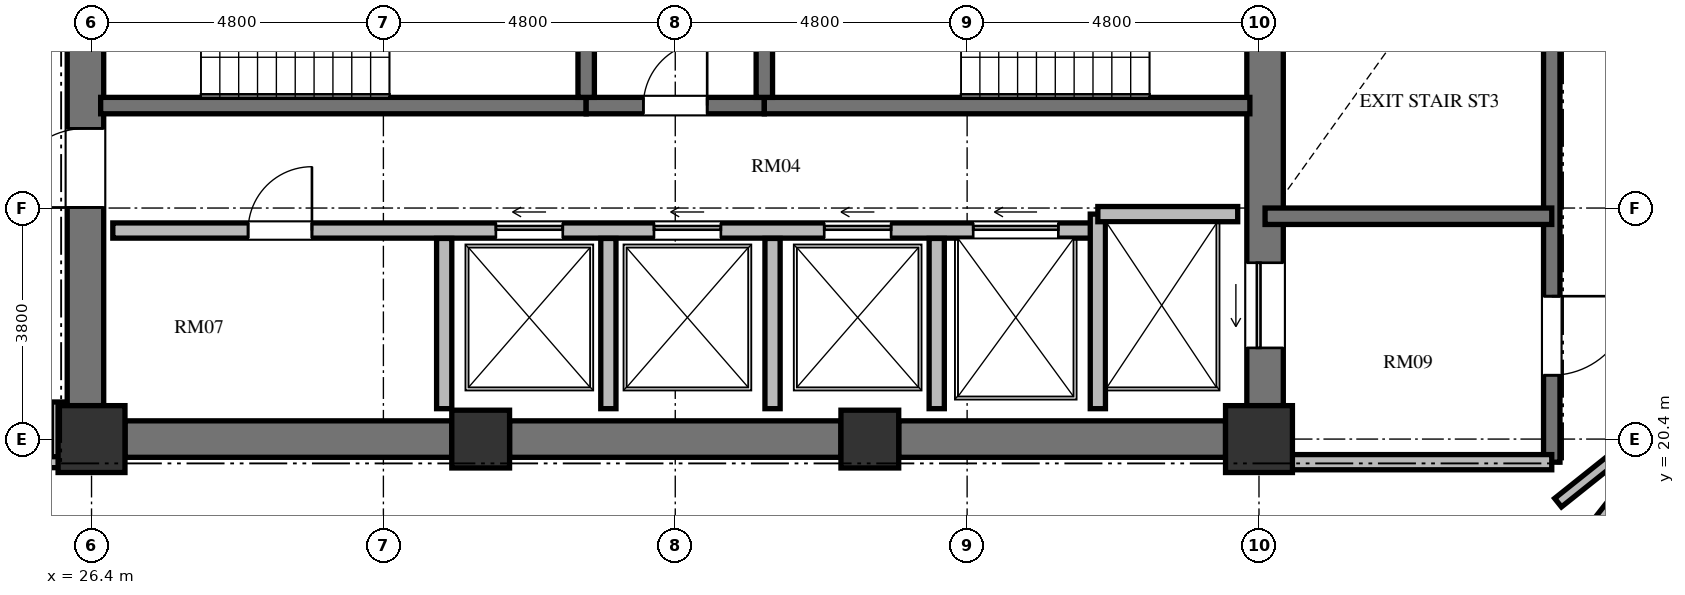
"""IFC4 building model, lengths in metres.
Left out: names, types, materials, properties, quantities, classifications, styles, units other than length and angle.
Written with IfcOpenShell. Run it as: python <this file> out.ifc"""

import sys

from ifc_helpers import new_model, si_unit, direction, frame, frame_2d, origin, origin_2d, place, context, subcontext, project, spatial, rectangle, extrude, element, fill, save


model = new_model("IFC4")
c1 = context("Model", 3, precision=1e-05, world=origin(), true_north=direction((0.0, 1.0)))
c2 = subcontext(c1, "Body", "Model", "MODEL_VIEW")
j1 = project(units=[si_unit("LENGTHUNIT", "METRE"), si_unit("PLANEANGLEUNIT", "RADIAN")], contexts=[c1])
p1 = place(None, origin())
s1 = spatial("IfcSite", under=j1, at=p1, CompositionType="ELEMENT")
p2 = place(p1, origin())
s2 = spatial("IfcBuilding", under=s1, at=p2, CompositionType="ELEMENT")
p3 = place(p2, frame((0.0, 0.0, 178.416)))
s3 = spatial("IfcBuildingStorey", under=s2, at=p3, CompositionType="ELEMENT", Elevation=178.416)
p4 = place(p3, frame((26.4, 20.4, 0.0), z_axis=(0.0, 0.0, 1.0), x_axis=(1.0, 0.0, 0.0)))
e1 = element("IfcColumn", 1, at=p4, inside=s3, PredefinedType="COLUMN", context=c2, shape_type="SweptSolid", body=[
    extrude(rectangle(XDim=1.1, YDim=1.1, at=origin_2d()), origin(), (0.0, 0.0, 1.0), 3.648),
])
for number, where, z_axis, x_axis in (
    (2, (32.8, 20.4, 0.0), (0.0, 0.0, 1.0), (1.0, 0.0, 0.0)),
    (3, (39.2, 20.4, 0.0), (0.0, 0.0, 1.0), (1.0, 0.0, 0.0)),
):
    element("IfcColumn", number, at=place(p3, frame(where, z_axis=z_axis, x_axis=x_axis)), inside=s3, PredefinedType="COLUMN", context=c2, shape_type="SweptSolid", body=[
        extrude(rectangle(XDim=0.95, YDim=0.95, at=origin_2d()), origin(), (0.0, 0.0, 1.0), 3.648),
    ])
p5 = place(p3, frame((45.6, 20.4, 0.0), z_axis=(0.0, 0.0, 1.0), x_axis=(1.0, 0.0, 0.0)))
e4 = element("IfcColumn", 4, at=p5, inside=s3, PredefinedType="COLUMN", context=c2, shape_type="SweptSolid", body=[
    extrude(rectangle(XDim=1.1, YDim=1.1, at=origin_2d()), origin(), (0.0, 0.0, 1.0), 3.648),
])
p6 = place(p3, frame((26.3, 20.95, 0.0), z_axis=(0.0, 0.0, 1.0), x_axis=(0.0, 1.0, 0.0)))
e5 = element("IfcWall", 5, at=p6, inside=s3, PredefinedType="SHEAR", context=c2, shape_type="SweptSolid", body=[
    extrude(rectangle(XDim=14.1, YDim=0.6, at=frame_2d((7.05, 0.0))), origin(), (0.0, 0.0, 1.0), 3.648),
])
p7 = place(p6, frame((6.5, 0.0, 0.0)))
e6 = element("IfcOpeningElement", 6, at=p7, cuts=e5, PredefinedType="OPENING", context=c2, shape_type="SweptSolid", body=[
    extrude(rectangle(XDim=1.2, YDim=2.15, at=frame_2d((0.6, 1.075))), frame((0.0, 0.31, 0.0), z_axis=(0.0, -1.0, 0.0), x_axis=(1.0, 0.0, 0.0)), (0.0, 0.0, 1.0), 0.62),
])
p8 = place(p6, frame((9.6, 0.0, 0.0)))
e7 = element("IfcOpeningElement", 7, at=p8, cuts=e5, PredefinedType="OPENING", context=c2, shape_type="SweptSolid", body=[
    extrude(rectangle(XDim=1.3, YDim=2.2, at=frame_2d((0.65, 1.1))), frame((0.0, 0.31, 0.0), z_axis=(0.0, -1.0, 0.0), x_axis=(1.0, 0.0, 0.0)), (0.0, 0.0, 1.0), 0.62),
])
p9 = place(p6, frame((3.26, 0.0, 0.0)))
e8 = element("IfcOpeningElement", 8, at=p9, cuts=e5, PredefinedType="OPENING", context=c2, shape_type="SweptSolid", body=[
    extrude(rectangle(XDim=1.3, YDim=2.2, at=frame_2d((0.65, 1.1))), frame((0.0, 0.31, 0.0), z_axis=(0.0, -1.0, 0.0), x_axis=(1.0, 0.0, 0.0)), (0.0, 0.0, 1.0), 0.62),
])
p10 = place(p3, frame((45.7, 20.95, 0.0), z_axis=(0.0, 0.0, 1.0), x_axis=(0.0, 1.0, 0.0)))
e9 = element("IfcWall", 9, at=p10, inside=s3, PredefinedType="SHEAR", context=c2, shape_type="SweptSolid", body=[
    extrude(rectangle(XDim=14.1, YDim=0.6, at=frame_2d((7.05, 0.0))), origin(), (0.0, 0.0, 1.0), 3.648),
])
p11 = place(p10, frame((11.75, 0.0, 0.0)))
e10 = element("IfcOpeningElement", 10, at=p11, cuts=e9, PredefinedType="OPENING", context=c2, shape_type="SweptSolid", body=[
    extrude(rectangle(XDim=1.4, YDim=2.3, at=frame_2d((0.7, 1.15))), frame((0.0, 0.31, 0.0), z_axis=(0.0, -1.0, 0.0), x_axis=(1.0, 0.0, 0.0)), (0.0, 0.0, 1.0), 0.62),
])
p12 = place(p10, frame((0.95, 0.0, 0.0)))
e11 = element("IfcOpeningElement", 11, at=p12, cuts=e9, PredefinedType="OPENING", context=c2, shape_type="SweptSolid", body=[
    extrude(rectangle(XDim=1.4, YDim=2.3, at=frame_2d((0.7, 1.15))), frame((0.0, 0.31, 0.0), z_axis=(0.0, -1.0, 0.0), x_axis=(1.0, 0.0, 0.0)), (0.0, 0.0, 1.0), 0.62),
])
p13 = place(p3, frame((26.95, 20.4, 0.0), z_axis=(0.0, 0.0, 1.0), x_axis=(1.0, 0.0, 0.0)))
e12 = element("IfcWall", 12, at=p13, inside=s3, PredefinedType="SHEAR", context=c2, shape_type="SweptSolid", body=[
    extrude(rectangle(XDim=5.375, YDim=0.6, at=frame_2d((2.688, 0.0))), origin(), (0.0, 0.0, 1.0), 3.648),
])
p14 = place(p3, frame((33.275, 20.4, 0.0), z_axis=(0.0, 0.0, 1.0), x_axis=(1.0, 0.0, 0.0)))
e13 = element("IfcWall", 13, at=p14, inside=s3, PredefinedType="SHEAR", context=c2, shape_type="SweptSolid", body=[
    extrude(rectangle(XDim=5.45, YDim=0.6, at=frame_2d((2.725, 0.0))), origin(), (0.0, 0.0, 1.0), 3.648),
])
p15 = place(p3, frame((39.675, 20.4, 0.0), z_axis=(0.0, 0.0, 1.0), x_axis=(1.0, 0.0, 0.0)))
e14 = element("IfcWall", 14, at=p15, inside=s3, PredefinedType="SHEAR", context=c2, shape_type="SweptSolid", body=[
    extrude(rectangle(XDim=5.375, YDim=0.6, at=frame_2d((2.688, 0.0))), origin(), (0.0, 0.0, 1.0), 3.648),
])
p16 = place(p3, frame((26.55, 25.885, 0.0), z_axis=(0.0, 0.0, 1.0), x_axis=(1.0, 0.0, 0.0)))
e15 = element("IfcWall", 15, at=p16, inside=s3, PredefinedType="SHEAR", context=c2, shape_type="SweptSolid", body=[
    extrude(rectangle(XDim=7.985, YDim=0.27, at=frame_2d((3.992, 0.0))), origin(), (0.0, 0.0, 1.0), 3.648),
])
p17 = place(p3, frame((34.535, 25.885, 0.0), z_axis=(0.0, 0.0, 1.0), x_axis=(1.0, 0.0, 0.0)))
e16 = element("IfcWall", 16, at=p17, inside=s3, PredefinedType="SHEAR", context=c2, shape_type="SweptSolid", body=[
    extrude(rectangle(XDim=2.93, YDim=0.27, at=frame_2d((1.465, 0.0))), origin(), (0.0, 0.0, 1.0), 3.648),
])
p18 = place(p17, frame((0.94, 0.0, 0.0)))
e17 = element("IfcOpeningElement", 17, at=p18, cuts=e16, PredefinedType="OPENING", context=c2, shape_type="SweptSolid", body=[
    extrude(rectangle(XDim=1.05, YDim=2.15, at=frame_2d((0.525, 1.075))), frame((0.0, 0.145, 0.0), z_axis=(0.0, -1.0, 0.0), x_axis=(1.0, 0.0, 0.0)), (0.0, 0.0, 1.0), 0.29),
])
p19 = place(p3, frame((37.465, 25.885, 0.0), z_axis=(0.0, 0.0, 1.0), x_axis=(1.0, 0.0, 0.0)))
e18 = element("IfcWall", 18, at=p19, inside=s3, PredefinedType="SHEAR", context=c2, shape_type="SweptSolid", body=[
    extrude(rectangle(XDim=7.985, YDim=0.27, at=frame_2d((3.992, 0.0))), origin(), (0.0, 0.0, 1.0), 3.648),
])
for number, where, z_axis, x_axis in (
    (19, (34.535, 26.02, 0.0), (0.0, 0.0, 1.0), (0.0, 1.0, 0.0)),
    (20, (37.465, 26.02, 0.0), (0.0, 0.0, 1.0), (0.0, 1.0, 0.0)),
):
    element("IfcWall", number, at=place(p3, frame(where, z_axis=z_axis, x_axis=x_axis)), inside=s3, PredefinedType="SHEAR", context=c2, shape_type="SweptSolid", body=[
        extrude(rectangle(XDim=4.08, YDim=0.27, at=frame_2d((2.04, 0.0))), origin(), (0.0, 0.0, 1.0), 3.648),
    ])
p20 = place(p3, frame((26.75, 23.83, 0.0), z_axis=(0.0, 0.0, 1.0), x_axis=(1.0, 0.0, 0.0)))
e21 = element("IfcWall", 21, at=p20, inside=s3, PredefinedType="SOLIDWALL", context=c2, shape_type="SweptSolid", body=[
    extrude(rectangle(XDim=16.2, YDim=0.25, at=frame_2d((8.1, 0.0))), origin(), (0.0, 0.0, 1.0), 3.428),
])
p21 = place(p20, frame((2.225, 0.0, 0.0)))
e22 = element("IfcOpeningElement", 22, at=p21, cuts=e21, PredefinedType="OPENING", context=c2, shape_type="SweptSolid", body=[
    extrude(rectangle(XDim=1.05, YDim=2.15, at=frame_2d((0.525, 1.075))), frame((0.0, 0.135, 0.0), z_axis=(0.0, -1.0, 0.0), x_axis=(1.0, 0.0, 0.0)), (0.0, 0.0, 1.0), 0.27),
])
p22 = place(p20, frame((6.3, 0.0, 0.0)))
e23 = element("IfcOpeningElement", 23, at=p22, cuts=e21, PredefinedType="OPENING", context=c2, shape_type="SweptSolid", body=[
    extrude(rectangle(XDim=1.1, YDim=2.2, at=frame_2d((0.55, 1.1))), frame((0.0, 0.135, 0.0), z_axis=(0.0, -1.0, 0.0), x_axis=(1.0, 0.0, 0.0)), (0.0, 0.0, 1.0), 0.27),
])
p23 = place(p20, frame((8.9, 0.0, 0.0)))
e24 = element("IfcOpeningElement", 24, at=p23, cuts=e21, PredefinedType="OPENING", context=c2, shape_type="SweptSolid", body=[
    extrude(rectangle(XDim=1.1, YDim=2.2, at=frame_2d((0.55, 1.1))), frame((0.0, 0.135, 0.0), z_axis=(0.0, -1.0, 0.0), x_axis=(1.0, 0.0, 0.0)), (0.0, 0.0, 1.0), 0.27),
])
p24 = place(p20, frame((11.7, 0.0, 0.0)))
e25 = element("IfcOpeningElement", 25, at=p24, cuts=e21, PredefinedType="OPENING", context=c2, shape_type="SweptSolid", body=[
    extrude(rectangle(XDim=1.1, YDim=2.2, at=frame_2d((0.55, 1.1))), frame((0.0, 0.135, 0.0), z_axis=(0.0, -1.0, 0.0), x_axis=(1.0, 0.0, 0.0)), (0.0, 0.0, 1.0), 0.27),
])
p25 = place(p20, frame((14.15, 0.0, 0.0)))
e26 = element("IfcOpeningElement", 26, at=p25, cuts=e21, PredefinedType="OPENING", context=c2, shape_type="SweptSolid", body=[
    extrude(rectangle(XDim=1.4, YDim=2.3, at=frame_2d((0.7, 1.15))), frame((0.0, 0.135, 0.0), z_axis=(0.0, -1.0, 0.0), x_axis=(1.0, 0.0, 0.0)), (0.0, 0.0, 1.0), 0.27),
])
p26 = place(p3, frame((42.95, 20.9, 0.0), z_axis=(0.0, 0.0, 1.0), x_axis=(0.0, 1.0, 0.0)))
e27 = element("IfcWall", 27, at=p26, inside=s3, PredefinedType="SOLIDWALL", context=c2, shape_type="SweptSolid", body=[
    extrude(rectangle(XDim=3.2, YDim=0.25, at=frame_2d((1.6, 0.0))), origin(), (0.0, 0.0, 1.0), 3.428),
])
p27 = place(p3, frame((42.95, 24.1, 0.0), z_axis=(0.0, 0.0, 1.0), x_axis=(1.0, 0.0, 0.0)))
e28 = element("IfcWall", 28, at=p27, inside=s3, PredefinedType="SOLIDWALL", context=c2, shape_type="SweptSolid", body=[
    extrude(rectangle(XDim=2.3, YDim=0.25, at=frame_2d((1.15, 0.0))), origin(), (0.0, 0.0, 1.0), 3.428),
])
for number, where, z_axis, x_axis in (
    (29, (32.2, 20.9, 0.0), (0.0, 0.0, 1.0), (0.0, 1.0, 0.0)),
    (30, (34.9, 20.9, 0.0), (0.0, 0.0, 1.0), (0.0, 1.0, 0.0)),
    (31, (37.6, 20.9, 0.0), (0.0, 0.0, 1.0), (0.0, 1.0, 0.0)),
    (32, (40.3, 20.9, 0.0), (0.0, 0.0, 1.0), (0.0, 1.0, 0.0)),
):
    element("IfcWall", number, at=place(p3, frame(where, z_axis=z_axis, x_axis=x_axis)), inside=s3, PredefinedType="SOLIDWALL", context=c2, shape_type="SweptSolid", body=[
        extrude(rectangle(XDim=2.8, YDim=0.25, at=frame_2d((1.4, 0.0))), origin(), (0.0, 0.0, 1.0), 3.428),
    ])
p28 = place(p3, frame((50.415, 35.845, 0.0), z_axis=(0.0, 0.0, 1.0), x_axis=(0.0, -1.0, 0.0)))
e33 = element("IfcWall", 33, at=p28, inside=s3, PredefinedType="SHEAR", context=c2, shape_type="SweptSolid", body=[
    extrude(rectangle(XDim=15.825, YDim=0.27, at=frame_2d((7.913, 0.0))), origin(), (0.0, 0.0, 1.0), 3.648),
])
p29 = place(p28, frame((4.445, 0.0, 0.0)))
e34 = element("IfcOpeningElement", 34, at=p29, cuts=e33, PredefinedType="OPENING", context=c2, shape_type="SweptSolid", body=[
    extrude(rectangle(XDim=1.2, YDim=2.15, at=frame_2d((0.6, 1.075))), frame((0.0, 0.145, 0.0), z_axis=(0.0, -1.0, 0.0), x_axis=(1.0, 0.0, 0.0)), (0.0, 0.0, 1.0), 0.29),
])
p30 = place(p28, frame((1.295, 0.0, 0.0)))
e35 = element("IfcOpeningElement", 35, at=p30, cuts=e33, PredefinedType="OPENING", context=c2, shape_type="SweptSolid", body=[
    extrude(rectangle(XDim=1.3, YDim=2.2, at=frame_2d((0.65, 1.1))), frame((0.0, 0.145, 0.0), z_axis=(0.0, -1.0, 0.0), x_axis=(1.0, 0.0, 0.0)), (0.0, 0.0, 1.0), 0.29),
])
p31 = place(p28, frame((13.095, 0.0, 0.0)))
e36 = element("IfcOpeningElement", 36, at=p31, cuts=e33, PredefinedType="OPENING", context=c2, shape_type="SweptSolid", body=[
    extrude(rectangle(XDim=1.3, YDim=2.2, at=frame_2d((0.65, 1.1))), frame((0.0, 0.145, 0.0), z_axis=(0.0, -1.0, 0.0), x_axis=(1.0, 0.0, 0.0)), (0.0, 0.0, 1.0), 0.29),
])
p32 = place(p3, frame((45.7, 24.065, 0.0), z_axis=(0.0, 0.0, 1.0), x_axis=(1.0, 0.0, 0.0)))
e37 = element("IfcWall", 37, at=p32, inside=s3, PredefinedType="SHEAR", context=c2, shape_type="SweptSolid", body=[
    extrude(rectangle(XDim=4.715, YDim=0.27, at=frame_2d((2.357, 0.0))), origin(), (0.0, 0.0, 1.0), 3.648),
])
p33 = place(p3, frame((45.7, 20.02, 0.0), z_axis=(0.0, 0.0, 1.0), x_axis=(1.0, 0.0, 0.0)))
e38 = element("IfcWall", 38, at=p33, inside=s3, PredefinedType="SOLIDWALL", context=c2, shape_type="SweptSolid", body=[
    extrude(rectangle(XDim=4.715, YDim=0.25, at=frame_2d((2.357, 0.0))), origin(), (0.0, 0.0, 1.0), 3.428),
])
p34 = place(p3, frame((53.181, 21.481, 0.0), z_axis=(0.0, 0.0, 1.0), x_axis=(-0.781420737726, -0.624004511724, 0.0)))
e39 = element("IfcWall", 39, at=p34, inside=s3, PredefinedType="PARTITIONING", context=c2, shape_type="SweptSolid", body=[
    extrude(rectangle(XDim=3.407, YDim=0.18, at=frame_2d((1.704, 0.0))), origin(), (0.0, 0.0, 1.0), 3.428),
])
p35 = place(p3, frame((25.83, 21.01, 0.0), z_axis=(0.0, 0.0, 1.0), x_axis=(0.0, -1.0, 0.0)))
e40 = element("IfcWall", 40, at=p35, inside=s3, PredefinedType="PARTITIONING", context=c2, shape_type="SweptSolid", body=[
    extrude(rectangle(XDim=1.03, YDim=0.18, at=frame_2d((0.515, 0.0))), origin(), (0.0, 0.0, 1.0), 3.428),
])
p36 = place(p3, frame((25.87, 20.02, 0.0), z_axis=(0.0, 0.0, 1.0), x_axis=(-1.0, 0.0, 0.0)))
e41 = element("IfcWall", 41, at=p36, inside=s3, PredefinedType="PARTITIONING", context=c2, shape_type="SweptSolid", body=[
    extrude(rectangle(XDim=2.56, YDim=0.18, at=frame_2d((1.28, 0.0))), origin(), (0.0, 0.0, 1.0), 3.428),
])
p37 = place(p36, frame((0.58, 0.0, 0.0)))
e42 = element("IfcOpeningElement", 42, at=p37, cuts=e41, PredefinedType="OPENING", context=c2, shape_type="SweptSolid", body=[
    extrude(rectangle(XDim=1.4, YDim=2.2, at=frame_2d((0.7, 1.1))), frame((0.0, 0.1, 0.0), z_axis=(0.0, -1.0, 0.0), x_axis=(1.0, 0.0, 0.0)), (0.0, 0.0, 1.0), 0.2),
])
p38 = place(p3, frame((52.537, 20.783, 0.0), z_axis=(0.0, 0.0, 1.0), x_axis=(-0.617570357244, -0.786515641201, 0.0)))
e43 = element("IfcWall", 43, at=p38, inside=s3, PredefinedType="PARTITIONING", context=c2, shape_type="SweptSolid", body=[
    extrude(rectangle(XDim=6.74, YDim=0.15, at=frame_2d((3.37, 0.0))), origin(), (0.0, 0.0, 1.0), 2.863),
])
p39 = place(p18, origin())
e44 = element("IfcDoor", 44, at=p39, inside=s3, OperationType="SINGLE_SWING_RIGHT", PredefinedType="DOOR", context=c2, shape_type="SweptSolid", body=[
    extrude(rectangle(XDim=1.05, YDim=2.15, at=frame_2d((0.525, 1.075))), frame((0.0, 0.025, 0.0), z_axis=(0.0, -1.0, 0.0), x_axis=(1.0, 0.0, 0.0)), (0.0, 0.0, 1.0), 0.05),
])
fill(e17, e44)
p40 = place(p9, origin())
e45 = element("IfcDoor", 45, at=p40, inside=s3, OperationType="SINGLE_SWING_LEFT", PredefinedType="DOOR", context=c2, shape_type="SweptSolid", body=[
    extrude(rectangle(XDim=1.3, YDim=2.2, at=frame_2d((0.65, 1.1))), frame((0.0, 0.025, 0.0), z_axis=(0.0, -1.0, 0.0), x_axis=(1.0, 0.0, 0.0)), (0.0, 0.0, 1.0), 0.05),
])
fill(e8, e45)
p41 = place(p21, origin())
e46 = element("IfcDoor", 46, at=p41, inside=s3, OperationType="SINGLE_SWING_RIGHT", PredefinedType="DOOR", context=c2, shape_type="SweptSolid", body=[
    extrude(rectangle(XDim=1.05, YDim=2.15, at=frame_2d((0.525, 1.075))), frame((0.0, 0.025, 0.0), z_axis=(0.0, -1.0, 0.0), x_axis=(1.0, 0.0, 0.0)), (0.0, 0.0, 1.0), 0.05),
])
fill(e22, e46)
p42 = place(p22, origin())
e47 = element("IfcDoor", 47, at=p42, inside=s3, OperationType="SLIDING_TO_LEFT", PredefinedType="DOOR", context=c2, shape_type="SweptSolid", body=[
    extrude(rectangle(XDim=1.1, YDim=2.2, at=frame_2d((0.55, 1.1))), frame((0.0, 0.025, 0.0), z_axis=(0.0, -1.0, 0.0), x_axis=(1.0, 0.0, 0.0)), (0.0, 0.0, 1.0), 0.05),
])
fill(e23, e47)
p43 = place(p23, origin())
e48 = element("IfcDoor", 48, at=p43, inside=s3, OperationType="SLIDING_TO_LEFT", PredefinedType="DOOR", context=c2, shape_type="SweptSolid", body=[
    extrude(rectangle(XDim=1.1, YDim=2.2, at=frame_2d((0.55, 1.1))), frame((0.0, 0.025, 0.0), z_axis=(0.0, -1.0, 0.0), x_axis=(1.0, 0.0, 0.0)), (0.0, 0.0, 1.0), 0.05),
])
fill(e24, e48)
p44 = place(p24, origin())
e49 = element("IfcDoor", 49, at=p44, inside=s3, OperationType="SLIDING_TO_LEFT", PredefinedType="DOOR", context=c2, shape_type="SweptSolid", body=[
    extrude(rectangle(XDim=1.1, YDim=2.2, at=frame_2d((0.55, 1.1))), frame((0.0, 0.025, 0.0), z_axis=(0.0, -1.0, 0.0), x_axis=(1.0, 0.0, 0.0)), (0.0, 0.0, 1.0), 0.05),
])
fill(e25, e49)
p45 = place(p12, origin())
e50 = element("IfcDoor", 50, at=p45, inside=s3, OperationType="SLIDING_TO_LEFT", PredefinedType="DOOR", context=c2, shape_type="SweptSolid", body=[
    extrude(rectangle(XDim=1.4, YDim=2.3, at=frame_2d((0.7, 1.15))), frame((0.0, 0.025, 0.0), z_axis=(0.0, -1.0, 0.0), x_axis=(1.0, 0.0, 0.0)), (0.0, 0.0, 1.0), 0.05),
])
fill(e11, e50)
p46 = place(p25, origin())
e51 = element("IfcDoor", 51, at=p46, inside=s3, OperationType="SLIDING_TO_LEFT", PredefinedType="DOOR", context=c2, shape_type="SweptSolid", body=[
    extrude(rectangle(XDim=1.4, YDim=2.3, at=frame_2d((0.7, 1.15))), frame((0.0, 0.025, 0.0), z_axis=(0.0, -1.0, 0.0), x_axis=(1.0, 0.0, 0.0)), (0.0, 0.0, 1.0), 0.05),
])
fill(e26, e51)
p47 = place(p31, origin())
e52 = element("IfcDoor", 52, at=p47, inside=s3, OperationType="SINGLE_SWING_LEFT", PredefinedType="DOOR", context=c2, shape_type="SweptSolid", body=[
    extrude(rectangle(XDim=1.3, YDim=2.2, at=frame_2d((0.65, 1.1))), frame((0.0, 0.025, 0.0), z_axis=(0.0, -1.0, 0.0), x_axis=(1.0, 0.0, 0.0)), (0.0, 0.0, 1.0), 0.05),
])
fill(e36, e52)
save(model, sys.argv[1])
